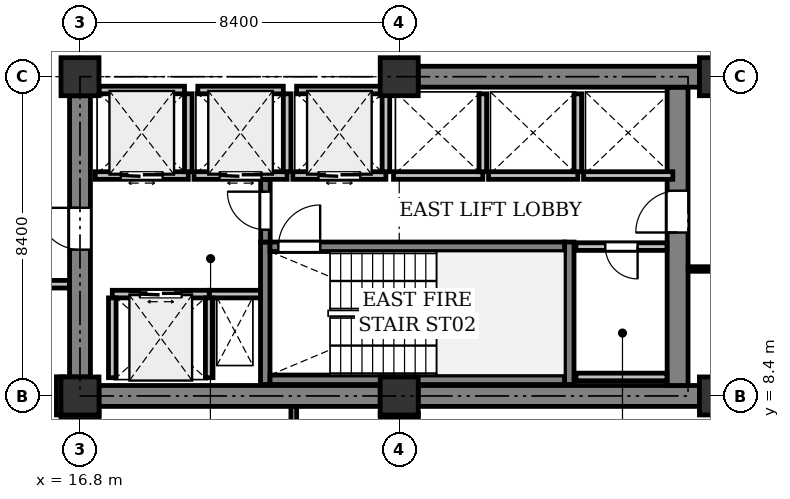
"""IFC4 building model, lengths in metres.
Left out: names, types, materials, properties, quantities, classifications, styles, units other than length and angle.
Written with IfcOpenShell. Run it as: python <this file> out.ifc"""

import sys

from ifc_helpers import new_model, si_unit, direction, frame, frame_2d, origin, origin_2d, place, context, subcontext, project, spatial, rectangle, extrude, element, fill, save


model = new_model("IFC4")
c1 = context("Model", 3, precision=1e-05, world=origin(), true_north=direction((0.0, 1.0)))
c2 = subcontext(c1, "Body", "Model", "MODEL_VIEW")
j1 = project(units=[si_unit("LENGTHUNIT", "METRE"), si_unit("PLANEANGLEUNIT", "RADIAN")], contexts=[c1])
p1 = place(None, origin())
s1 = spatial("IfcSite", under=j1, at=p1, CompositionType="ELEMENT")
p2 = place(p1, origin())
s2 = spatial("IfcBuilding", under=s1, at=p2, CompositionType="ELEMENT")
p3 = place(p2, frame((0.0, 0.0, 196.0)))
s3 = spatial("IfcBuildingStorey", under=s2, at=p3, CompositionType="ELEMENT", Elevation=196.0)
for number, where, z_axis, x_axis in (
    (1, (16.8, 8.4, 0.0), (0.0, 0.0, 1.0), (1.0, 0.0, 0.0)),
    (2, (16.8, 16.8, 0.0), (0.0, 0.0, 1.0), (1.0, 0.0, 0.0)),
    (3, (25.2, 8.4, 0.0), (0.0, 0.0, 1.0), (1.0, 0.0, 0.0)),
    (4, (25.2, 16.8, 0.0), (0.0, 0.0, 1.0), (1.0, 0.0, 0.0)),
    (5, (33.6, 8.4, 0.0), (0.0, 0.0, 1.0), (1.0, 0.0, 0.0)),
    (6, (33.6, 16.8, 0.0), (0.0, 0.0, 1.0), (1.0, 0.0, 0.0)),
):
    element("IfcColumn", number, at=place(p3, frame(where, z_axis=z_axis, x_axis=x_axis)), inside=s3, PredefinedType="COLUMN", context=c2, shape_type="SweptSolid", body=[
        extrude(rectangle(XDim=1.0, YDim=1.0, at=origin_2d()), origin(), (0.0, 0.0, 1.0), 4.1),
    ])
p4 = place(p3, frame((17.3, 8.4, 0.0), z_axis=(0.0, 0.0, 1.0), x_axis=(1.0, 0.0, 0.0)))
e7 = element("IfcWall", 7, at=p4, inside=s3, PredefinedType="SHEAR", context=c2, shape_type="SweptSolid", body=[
    extrude(rectangle(XDim=7.4, YDim=0.55, at=frame_2d((3.7, 0.0))), origin(), (0.0, 0.0, 1.0), 3.825),
])
p5 = place(p3, frame((25.7, 8.4, 0.0), z_axis=(0.0, 0.0, 1.0), x_axis=(1.0, 0.0, 0.0)))
e8 = element("IfcWall", 8, at=p5, inside=s3, PredefinedType="SHEAR", context=c2, shape_type="SweptSolid", body=[
    extrude(rectangle(XDim=7.4, YDim=0.55, at=frame_2d((3.7, 0.0))), origin(), (0.0, 0.0, 1.0), 3.825),
])
p6 = place(p3, frame((32.525, 8.675, 0.0), z_axis=(0.0, 0.0, 1.0), x_axis=(0.0, 1.0, 0.0)))
e9 = element("IfcWall", 9, at=p6, inside=s3, PredefinedType="SHEAR", context=c2, shape_type="SweptSolid", body=[
    extrude(rectangle(XDim=7.85, YDim=0.55, at=frame_2d((3.925, 0.0))), origin(), (0.0, 0.0, 1.0), 3.825),
])
p7 = place(p6, frame((4.025, 0.0, 0.0)))
e10 = element("IfcOpeningElement", 10, at=p7, cuts=e9, PredefinedType="OPENING", context=c2, shape_type="SweptSolid", body=[
    extrude(rectangle(XDim=1.1, YDim=2.15, at=frame_2d((0.55, 1.075))), frame((0.0, 0.285, 0.0), z_axis=(0.0, -1.0, 0.0), x_axis=(1.0, 0.0, 0.0)), (0.0, 0.0, 1.0), 0.57),
])
p8 = place(p3, frame((16.8, 8.9, 0.0), z_axis=(0.0, 0.0, 1.0), x_axis=(0.0, 1.0, 0.0)))
e11 = element("IfcWall", 11, at=p8, inside=s3, PredefinedType="SHEAR", context=c2, shape_type="SweptSolid", body=[
    extrude(rectangle(XDim=7.4, YDim=0.55, at=frame_2d((3.7, 0.0))), origin(), (0.0, 0.0, 1.0), 3.825),
])
p9 = place(p8, frame((3.35, 0.0, 0.0)))
e12 = element("IfcOpeningElement", 12, at=p9, cuts=e11, PredefinedType="OPENING", context=c2, shape_type="SweptSolid", body=[
    extrude(rectangle(XDim=1.1, YDim=2.15, at=frame_2d((0.55, 1.075))), frame((0.0, 0.285, 0.0), z_axis=(0.0, -1.0, 0.0), x_axis=(1.0, 0.0, 0.0)), (0.0, 0.0, 1.0), 0.57),
])
p10 = place(p3, frame((25.7, 16.8, 0.0), z_axis=(0.0, 0.0, 1.0), x_axis=(1.0, 0.0, 0.0)))
e13 = element("IfcWall", 13, at=p10, inside=s3, PredefinedType="SHEAR", context=c2, shape_type="SweptSolid", body=[
    extrude(rectangle(XDim=7.4, YDim=0.55, at=frame_2d((3.7, 0.0))), origin(), (0.0, 0.0, 1.0), 3.825),
])
for number, where, z_axis, x_axis in (
    (14, (21.675, 8.7, 0.0), (0.0, 0.0, 1.0), (0.0, 1.0, 0.0)),
    (15, (29.675, 8.7, 0.0), (0.0, 0.0, 1.0), (0.0, 1.0, 0.0)),
):
    element("IfcWall", number, at=place(p3, frame(where, z_axis=z_axis, x_axis=x_axis)), inside=s3, PredefinedType="SHEAR", context=c2, shape_type="SweptSolid", body=[
        extrude(rectangle(XDim=3.75, YDim=0.25, at=frame_2d((1.875, 0.0))), origin(), (0.0, 0.0, 1.0), 3.825),
    ])
p11 = place(p3, frame((21.8, 8.825, 0.0), z_axis=(0.0, 0.0, 1.0), x_axis=(1.0, 0.0, 0.0)))
e16 = element("IfcWall", 16, at=p11, inside=s3, PredefinedType="SHEAR", context=c2, shape_type="SweptSolid", body=[
    extrude(rectangle(XDim=7.75, YDim=0.25, at=frame_2d((3.875, 0.0))), origin(), (0.0, 0.0, 1.0), 3.825),
])
p12 = place(p3, frame((21.8, 12.325, 0.0), z_axis=(0.0, 0.0, 1.0), x_axis=(1.0, 0.0, 0.0)))
e17 = element("IfcWall", 17, at=p12, inside=s3, PredefinedType="SHEAR", context=c2, shape_type="SweptSolid", body=[
    extrude(rectangle(XDim=7.75, YDim=0.25, at=frame_2d((3.875, 0.0))), origin(), (0.0, 0.0, 1.0), 3.825),
])
p13 = place(p12, frame((0.22, 0.0, 0.0)))
e18 = element("IfcOpeningElement", 18, at=p13, cuts=e17, PredefinedType="OPENING", context=c2, shape_type="SweptSolid", body=[
    extrude(rectangle(XDim=1.1, YDim=2.15, at=frame_2d((0.55, 1.075))), frame((0.0, 0.135, 0.0), z_axis=(0.0, -1.0, 0.0), x_axis=(1.0, 0.0, 0.0)), (0.0, 0.0, 1.0), 0.27),
])
p14 = place(p3, frame((20.2, 11.08, 0.0), z_axis=(0.0, 0.0, 1.0), x_axis=(1.0, 0.0, 0.0)))
e19 = element("IfcWall", 19, at=p14, inside=s3, PredefinedType="PARTITIONING", context=c2, shape_type="SweptSolid", body=[
    extrude(rectangle(XDim=1.35, YDim=0.2, at=frame_2d((0.675, 0.0))), origin(), (0.0, 0.0, 1.0), 3.825),
])
p15 = place(p3, frame((21.68, 12.45, 0.0), z_axis=(0.0, 0.0, 1.0), x_axis=(0.0, 1.0, 0.0)))
e20 = element("IfcWall", 20, at=p15, inside=s3, PredefinedType="SHEAR", context=c2, shape_type="SweptSolid", body=[
    extrude(rectangle(XDim=1.65, YDim=0.25, at=frame_2d((0.825, 0.0))), origin(), (0.0, 0.0, 1.0), 3.825),
])
p16 = place(p15, frame((0.325, 0.0, 0.0)))
e21 = element("IfcOpeningElement", 21, at=p16, cuts=e20, PredefinedType="OPENING", context=c2, shape_type="SweptSolid", body=[
    extrude(rectangle(XDim=1.0, YDim=2.15, at=frame_2d((0.5, 1.075))), frame((0.0, 0.135, 0.0), z_axis=(0.0, -1.0, 0.0), x_axis=(1.0, 0.0, 0.0)), (0.0, 0.0, 1.0), 0.27),
])
p17 = place(p3, frame((17.65, 11.08, 0.0), z_axis=(0.0, 0.0, 1.0), x_axis=(1.0, 0.0, 0.0)))
e22 = element("IfcWall", 22, at=p17, inside=s3, PredefinedType="PARTITIONING", context=c2, shape_type="SweptSolid", body=[
    extrude(rectangle(XDim=2.55, YDim=0.2, at=frame_2d((1.275, 0.0))), origin(), (0.0, 0.0, 1.0), 3.825),
])
p18 = place(p17, frame((0.725, 0.0, 0.0)))
e23 = element("IfcOpeningElement", 23, at=p18, cuts=e22, PredefinedType="OPENING", context=c2, shape_type="SweptSolid", body=[
    extrude(rectangle(XDim=1.1, YDim=2.2, at=frame_2d((0.55, 1.1))), frame((0.0, 0.11, 0.0), z_axis=(0.0, -1.0, 0.0), x_axis=(1.0, 0.0, 0.0)), (0.0, 0.0, 1.0), 0.22),
])
for number, where, z_axis, x_axis in (
    (24, (20.2, 8.88, 0.0), (0.0, 0.0, 1.0), (0.0, 1.0, 0.0)),
    (25, (17.65, 8.88, 0.0), (0.0, 0.0, 1.0), (0.0, 1.0, 0.0)),
):
    element("IfcWall", number, at=place(p3, frame(where, z_axis=z_axis, x_axis=x_axis)), inside=s3, PredefinedType="PARTITIONING", context=c2, shape_type="SweptSolid", body=[
        extrude(rectangle(XDim=2.1, YDim=0.2, at=frame_2d((1.05, 0.0))), origin(), (0.0, 0.0, 1.0), 3.825),
    ])
p19 = place(p3, frame((17.2, 14.2, 0.0), z_axis=(0.0, 0.0, 1.0), x_axis=(1.0, 0.0, 0.0)))
e26 = element("IfcWall", 26, at=p19, inside=s3, PredefinedType="PARTITIONING", context=c2, shape_type="SweptSolid", body=[
    extrude(rectangle(XDim=2.45, YDim=0.2, at=frame_2d((1.225, 0.0))), origin(), (0.0, 0.0, 1.0), 3.825),
])
p20 = place(p19, frame((0.675, 0.0, 0.0)))
e27 = element("IfcOpeningElement", 27, at=p20, cuts=e26, PredefinedType="OPENING", context=c2, shape_type="SweptSolid", body=[
    extrude(rectangle(XDim=1.1, YDim=2.2, at=frame_2d((0.55, 1.1))), frame((0.0, 0.11, 0.0), z_axis=(0.0, -1.0, 0.0), x_axis=(1.0, 0.0, 0.0)), (0.0, 0.0, 1.0), 0.22),
])
p21 = place(p3, frame((19.65, 14.3, 0.0), z_axis=(0.0, 0.0, 1.0), x_axis=(0.0, 1.0, 0.0)))
e28 = element("IfcWall", 28, at=p21, inside=s3, PredefinedType="PARTITIONING", context=c2, shape_type="SweptSolid", body=[
    extrude(rectangle(XDim=2.05, YDim=0.2, at=frame_2d((1.025, 0.0))), origin(), (0.0, 0.0, 1.0), 3.825),
])
p22 = place(p3, frame((17.3, 16.45, 0.0), z_axis=(0.0, 0.0, 1.0), x_axis=(1.0, 0.0, 0.0)))
e29 = element("IfcWall", 29, at=p22, inside=s3, PredefinedType="PARTITIONING", context=c2, shape_type="SweptSolid", body=[
    extrude(rectangle(XDim=2.25, YDim=0.2, at=frame_2d((1.125, 0.0))), origin(), (0.0, 0.0, 1.0), 3.825),
])
p23 = place(p3, frame((19.8, 14.2, 0.0), z_axis=(0.0, 0.0, 1.0), x_axis=(1.0, 0.0, 0.0)))
e30 = element("IfcWall", 30, at=p23, inside=s3, PredefinedType="PARTITIONING", context=c2, shape_type="SweptSolid", body=[
    extrude(rectangle(XDim=2.45, YDim=0.2, at=frame_2d((1.225, 0.0))), origin(), (0.0, 0.0, 1.0), 3.825),
])
p24 = place(p23, frame((0.675, 0.0, 0.0)))
e31 = element("IfcOpeningElement", 31, at=p24, cuts=e30, PredefinedType="OPENING", context=c2, shape_type="SweptSolid", body=[
    extrude(rectangle(XDim=1.1, YDim=2.2, at=frame_2d((0.55, 1.1))), frame((0.0, 0.11, 0.0), z_axis=(0.0, -1.0, 0.0), x_axis=(1.0, 0.0, 0.0)), (0.0, 0.0, 1.0), 0.22),
])
p25 = place(p3, frame((22.25, 14.3, 0.0), z_axis=(0.0, 0.0, 1.0), x_axis=(0.0, 1.0, 0.0)))
e32 = element("IfcWall", 32, at=p25, inside=s3, PredefinedType="PARTITIONING", context=c2, shape_type="SweptSolid", body=[
    extrude(rectangle(XDim=2.05, YDim=0.2, at=frame_2d((1.025, 0.0))), origin(), (0.0, 0.0, 1.0), 3.825),
])
p26 = place(p3, frame((19.9, 16.45, 0.0), z_axis=(0.0, 0.0, 1.0), x_axis=(1.0, 0.0, 0.0)))
e33 = element("IfcWall", 33, at=p26, inside=s3, PredefinedType="PARTITIONING", context=c2, shape_type="SweptSolid", body=[
    extrude(rectangle(XDim=2.25, YDim=0.2, at=frame_2d((1.125, 0.0))), origin(), (0.0, 0.0, 1.0), 3.825),
])
p27 = place(p3, frame((22.4, 14.2, 0.0), z_axis=(0.0, 0.0, 1.0), x_axis=(1.0, 0.0, 0.0)))
e34 = element("IfcWall", 34, at=p27, inside=s3, PredefinedType="PARTITIONING", context=c2, shape_type="SweptSolid", body=[
    extrude(rectangle(XDim=2.45, YDim=0.2, at=frame_2d((1.225, 0.0))), origin(), (0.0, 0.0, 1.0), 3.825),
])
p28 = place(p27, frame((0.675, 0.0, 0.0)))
e35 = element("IfcOpeningElement", 35, at=p28, cuts=e34, PredefinedType="OPENING", context=c2, shape_type="SweptSolid", body=[
    extrude(rectangle(XDim=1.1, YDim=2.2, at=frame_2d((0.55, 1.1))), frame((0.0, 0.11, 0.0), z_axis=(0.0, -1.0, 0.0), x_axis=(1.0, 0.0, 0.0)), (0.0, 0.0, 1.0), 0.22),
])
p29 = place(p3, frame((24.85, 14.3, 0.0), z_axis=(0.0, 0.0, 1.0), x_axis=(0.0, 1.0, 0.0)))
e36 = element("IfcWall", 36, at=p29, inside=s3, PredefinedType="PARTITIONING", context=c2, shape_type="SweptSolid", body=[
    extrude(rectangle(XDim=2.05, YDim=0.2, at=frame_2d((1.025, 0.0))), origin(), (0.0, 0.0, 1.0), 3.825),
])
p30 = place(p3, frame((22.5, 16.45, 0.0), z_axis=(0.0, 0.0, 1.0), x_axis=(1.0, 0.0, 0.0)))
e37 = element("IfcWall", 37, at=p30, inside=s3, PredefinedType="PARTITIONING", context=c2, shape_type="SweptSolid", body=[
    extrude(rectangle(XDim=2.25, YDim=0.2, at=frame_2d((1.125, 0.0))), origin(), (0.0, 0.0, 1.0), 3.825),
])
p31 = place(p3, frame((25.05, 14.2, 0.0), z_axis=(0.0, 0.0, 1.0), x_axis=(1.0, 0.0, 0.0)))
e38 = element("IfcWall", 38, at=p31, inside=s3, PredefinedType="PARTITIONING", context=c2, shape_type="SweptSolid", body=[
    extrude(rectangle(XDim=2.35, YDim=0.2, at=frame_2d((1.175, 0.0))), origin(), (0.0, 0.0, 1.0), 3.825),
])
p32 = place(p3, frame((27.4, 14.3, 0.0), z_axis=(0.0, 0.0, 1.0), x_axis=(0.0, 1.0, 0.0)))
e39 = element("IfcWall", 39, at=p32, inside=s3, PredefinedType="PARTITIONING", context=c2, shape_type="SweptSolid", body=[
    extrude(rectangle(XDim=2.05, YDim=0.2, at=frame_2d((1.025, 0.0))), origin(), (0.0, 0.0, 1.0), 3.825),
])
p33 = place(p3, frame((27.55, 14.2, 0.0), z_axis=(0.0, 0.0, 1.0), x_axis=(1.0, 0.0, 0.0)))
e40 = element("IfcWall", 40, at=p33, inside=s3, PredefinedType="PARTITIONING", context=c2, shape_type="SweptSolid", body=[
    extrude(rectangle(XDim=2.35, YDim=0.2, at=frame_2d((1.175, 0.0))), origin(), (0.0, 0.0, 1.0), 3.825),
])
p34 = place(p3, frame((29.9, 14.3, 0.0), z_axis=(0.0, 0.0, 1.0), x_axis=(0.0, 1.0, 0.0)))
e41 = element("IfcWall", 41, at=p34, inside=s3, PredefinedType="PARTITIONING", context=c2, shape_type="SweptSolid", body=[
    extrude(rectangle(XDim=2.05, YDim=0.2, at=frame_2d((1.025, 0.0))), origin(), (0.0, 0.0, 1.0), 3.825),
])
p35 = place(p3, frame((30.05, 14.2, 0.0), z_axis=(0.0, 0.0, 1.0), x_axis=(1.0, 0.0, 0.0)))
e42 = element("IfcWall", 42, at=p35, inside=s3, PredefinedType="PARTITIONING", context=c2, shape_type="SweptSolid", body=[
    extrude(rectangle(XDim=2.35, YDim=0.2, at=frame_2d((1.175, 0.0))), origin(), (0.0, 0.0, 1.0), 3.825),
])
p36 = place(p3, frame((32.246, 12.33, 0.0), z_axis=(0.0, 0.0, 1.0), x_axis=(-1.0, 0.0, 0.0)))
e43 = element("IfcWall", 43, at=p36, inside=s3, PredefinedType="PARTITIONING", context=c2, shape_type="SweptSolid", body=[
    extrude(rectangle(XDim=2.396, YDim=0.2, at=frame_2d((1.198, 0.0))), origin(), (0.0, 0.0, 1.0), 3.825),
])
p37 = place(p36, frame((0.773, 0.0, 0.0)))
e44 = element("IfcOpeningElement", 44, at=p37, cuts=e43, PredefinedType="OPENING", context=c2, shape_type="SweptSolid", body=[
    extrude(rectangle(XDim=0.85, YDim=2.15, at=frame_2d((0.425, 1.075))), frame((0.0, 0.11, 0.0), z_axis=(0.0, -1.0, 0.0), x_axis=(1.0, 0.0, 0.0)), (0.0, 0.0, 1.0), 0.22),
])
p38 = place(p3, frame((29.85, 8.9, 0.0), z_axis=(0.0, 0.0, 1.0), x_axis=(1.0, 0.0, 0.0)))
e45 = element("IfcWall", 45, at=p38, inside=s3, PredefinedType="PARTITIONING", context=c2, shape_type="SweptSolid", body=[
    extrude(rectangle(XDim=2.396, YDim=0.2, at=frame_2d((1.198, 0.0))), origin(), (0.0, 0.0, 1.0), 3.825),
])
p39 = place(p3, frame((25.704, 7.88, 0.0), z_axis=(0.0, 0.0, 1.0), x_axis=(-0.999999881717, -0.000486381265, 0.0)))
e46 = element("IfcWall", 46, at=p39, inside=s3, PredefinedType="PARTITIONING", context=c2, shape_type="SweptSolid", body=[
    extrude(rectangle(XDim=1.004, YDim=0.12, at=frame_2d((0.502, 0.0))), origin(), (0.0, 0.0, 1.0), 3.371),
])
p40 = place(p3, frame((22.426, 8.121, 0.0), z_axis=(0.0, 0.0, 1.0), x_axis=(0.0, -1.0, 0.0)))
e47 = element("IfcWall", 47, at=p40, inside=s3, PredefinedType="PARTITIONING", context=c2, shape_type="SweptSolid", body=[
    extrude(rectangle(XDim=7.952, YDim=0.15, at=frame_2d((3.976, 0.0))), origin(), (0.0, 0.0, 1.0), 3.825),
])
p41 = place(p3, frame((34.261, 11.74, 0.0), z_axis=(0.0, 0.0, 1.0), x_axis=(-1.0, 0.0, 0.0)))
e48 = element("IfcWall", 48, at=p41, inside=s3, PredefinedType="PARTITIONING", context=c2, shape_type="SweptSolid", body=[
    extrude(rectangle(XDim=1.457, YDim=0.12, at=frame_2d((0.729, 0.0))), origin(), (0.0, 0.0, 1.0), 3.371),
])
p42 = place(p3, frame((17.304, 7.88, 0.0), z_axis=(0.0, 0.0, 1.0), x_axis=(-0.999999881717, -0.000486381265, 0.0)))
e49 = element("IfcWall", 49, at=p42, inside=s3, PredefinedType="PARTITIONING", context=c2, shape_type="SweptSolid", body=[
    extrude(rectangle(XDim=1.004, YDim=0.2, at=frame_2d((0.502, 0.0))), origin(), (0.0, 0.0, 1.0), 3.371),
])
p43 = place(p3, frame((16.28, 7.9, 0.0), z_axis=(0.0, 0.0, 1.0), x_axis=(0.000486381265, 0.999999881717, 0.0)))
e50 = element("IfcWall", 50, at=p43, inside=s3, PredefinedType="PARTITIONING", context=c2, shape_type="SweptSolid", body=[
    extrude(rectangle(XDim=1.004, YDim=0.2, at=frame_2d((0.502, 0.0))), origin(), (0.0, 0.0, 1.0), 3.365),
])
p44 = place(p3, frame((16.521, 11.34, 0.0), z_axis=(0.0, 0.0, 1.0), x_axis=(-1.0, 0.0, 0.0)))
e51 = element("IfcWall", 51, at=p44, inside=s3, PredefinedType="PARTITIONING", context=c2, shape_type="SweptSolid", body=[
    extrude(rectangle(XDim=8.811, YDim=0.2, at=frame_2d((4.406, 0.0))), origin(), (0.0, 0.0, 1.0), 3.371),
])
p45 = place(p44, frame((3.906, 0.0, 0.0)))
e52 = element("IfcOpeningElement", 52, at=p45, cuts=e51, PredefinedType="OPENING", context=c2, shape_type="SweptSolid", body=[
    extrude(rectangle(XDim=1.0, YDim=2.15, at=frame_2d((0.5, 1.075))), frame((0.0, 0.11, 0.0), z_axis=(0.0, -1.0, 0.0), x_axis=(1.0, 0.0, 0.0)), (0.0, 0.0, 1.0), 0.22),
])
p46 = place(p7, origin())
e53 = element("IfcDoor", 53, at=p46, inside=s3, OperationType="SINGLE_SWING_LEFT", PredefinedType="DOOR", context=c2, shape_type="SweptSolid", body=[
    extrude(rectangle(XDim=1.1, YDim=2.15, at=frame_2d((0.55, 1.075))), frame((0.0, 0.025, 0.0), z_axis=(0.0, -1.0, 0.0), x_axis=(1.0, 0.0, 0.0)), (0.0, 0.0, 1.0), 0.05),
])
fill(e10, e53)
p47 = place(p9, origin())
e54 = element("IfcDoor", 54, at=p47, inside=s3, OperationType="SINGLE_SWING_RIGHT", PredefinedType="DOOR", context=c2, shape_type="SweptSolid", body=[
    extrude(rectangle(XDim=1.1, YDim=2.15, at=frame_2d((0.55, 1.075))), frame((0.0, 0.025, 0.0), z_axis=(0.0, -1.0, 0.0), x_axis=(1.0, 0.0, 0.0)), (0.0, 0.0, 1.0), 0.05),
])
fill(e12, e54)
p48 = place(p13, origin())
e55 = element("IfcDoor", 55, at=p48, inside=s3, OperationType="SINGLE_SWING_RIGHT", PredefinedType="DOOR", context=c2, shape_type="SweptSolid", body=[
    extrude(rectangle(XDim=1.1, YDim=2.15, at=frame_2d((0.55, 1.075))), frame((0.0, 0.025, 0.0), z_axis=(0.0, -1.0, 0.0), x_axis=(1.0, 0.0, 0.0)), (0.0, 0.0, 1.0), 0.05),
])
fill(e18, e55)
p49 = place(p16, origin())
e56 = element("IfcDoor", 56, at=p49, inside=s3, OperationType="SINGLE_SWING_RIGHT", PredefinedType="DOOR", context=c2, shape_type="SweptSolid", body=[
    extrude(rectangle(XDim=1.0, YDim=2.15, at=frame_2d((0.5, 1.075))), frame((0.0, 0.025, 0.0), z_axis=(0.0, -1.0, 0.0), x_axis=(1.0, 0.0, 0.0)), (0.0, 0.0, 1.0), 0.05),
])
fill(e21, e56)
p50 = place(p18, origin())
e57 = element("IfcDoor", 57, at=p50, inside=s3, OperationType="DOUBLE_DOOR_SLIDING", PredefinedType="DOOR", context=c2, shape_type="SweptSolid", body=[
    extrude(rectangle(XDim=1.1, YDim=2.2, at=frame_2d((0.55, 1.1))), frame((0.0, 0.025, 0.0), z_axis=(0.0, -1.0, 0.0), x_axis=(1.0, 0.0, 0.0)), (0.0, 0.0, 1.0), 0.05),
])
fill(e23, e57)
p51 = place(p20, origin())
e58 = element("IfcDoor", 58, at=p51, inside=s3, OperationType="DOUBLE_DOOR_SLIDING", PredefinedType="DOOR", context=c2, shape_type="SweptSolid", body=[
    extrude(rectangle(XDim=1.1, YDim=2.2, at=frame_2d((0.55, 1.1))), frame((0.0, 0.025, 0.0), z_axis=(0.0, -1.0, 0.0), x_axis=(1.0, 0.0, 0.0)), (0.0, 0.0, 1.0), 0.05),
])
fill(e27, e58)
p52 = place(p24, origin())
e59 = element("IfcDoor", 59, at=p52, inside=s3, OperationType="DOUBLE_DOOR_SLIDING", PredefinedType="DOOR", context=c2, shape_type="SweptSolid", body=[
    extrude(rectangle(XDim=1.1, YDim=2.2, at=frame_2d((0.55, 1.1))), frame((0.0, 0.025, 0.0), z_axis=(0.0, -1.0, 0.0), x_axis=(1.0, 0.0, 0.0)), (0.0, 0.0, 1.0), 0.05),
])
fill(e31, e59)
p53 = place(p28, origin())
e60 = element("IfcDoor", 60, at=p53, inside=s3, OperationType="DOUBLE_DOOR_SLIDING", PredefinedType="DOOR", context=c2, shape_type="SweptSolid", body=[
    extrude(rectangle(XDim=1.1, YDim=2.2, at=frame_2d((0.55, 1.1))), frame((0.0, 0.025, 0.0), z_axis=(0.0, -1.0, 0.0), x_axis=(1.0, 0.0, 0.0)), (0.0, 0.0, 1.0), 0.05),
])
fill(e35, e60)
p54 = place(p37, origin())
e61 = element("IfcDoor", 61, at=p54, inside=s3, OperationType="SINGLE_SWING_LEFT", PredefinedType="DOOR", context=c2, shape_type="SweptSolid", body=[
    extrude(rectangle(XDim=0.85, YDim=2.15, at=frame_2d((0.425, 1.075))), frame((0.0, 0.025, 0.0), z_axis=(0.0, -1.0, 0.0), x_axis=(1.0, 0.0, 0.0)), (0.0, 0.0, 1.0), 0.05),
])
fill(e44, e61)
save(model, sys.argv[1])
